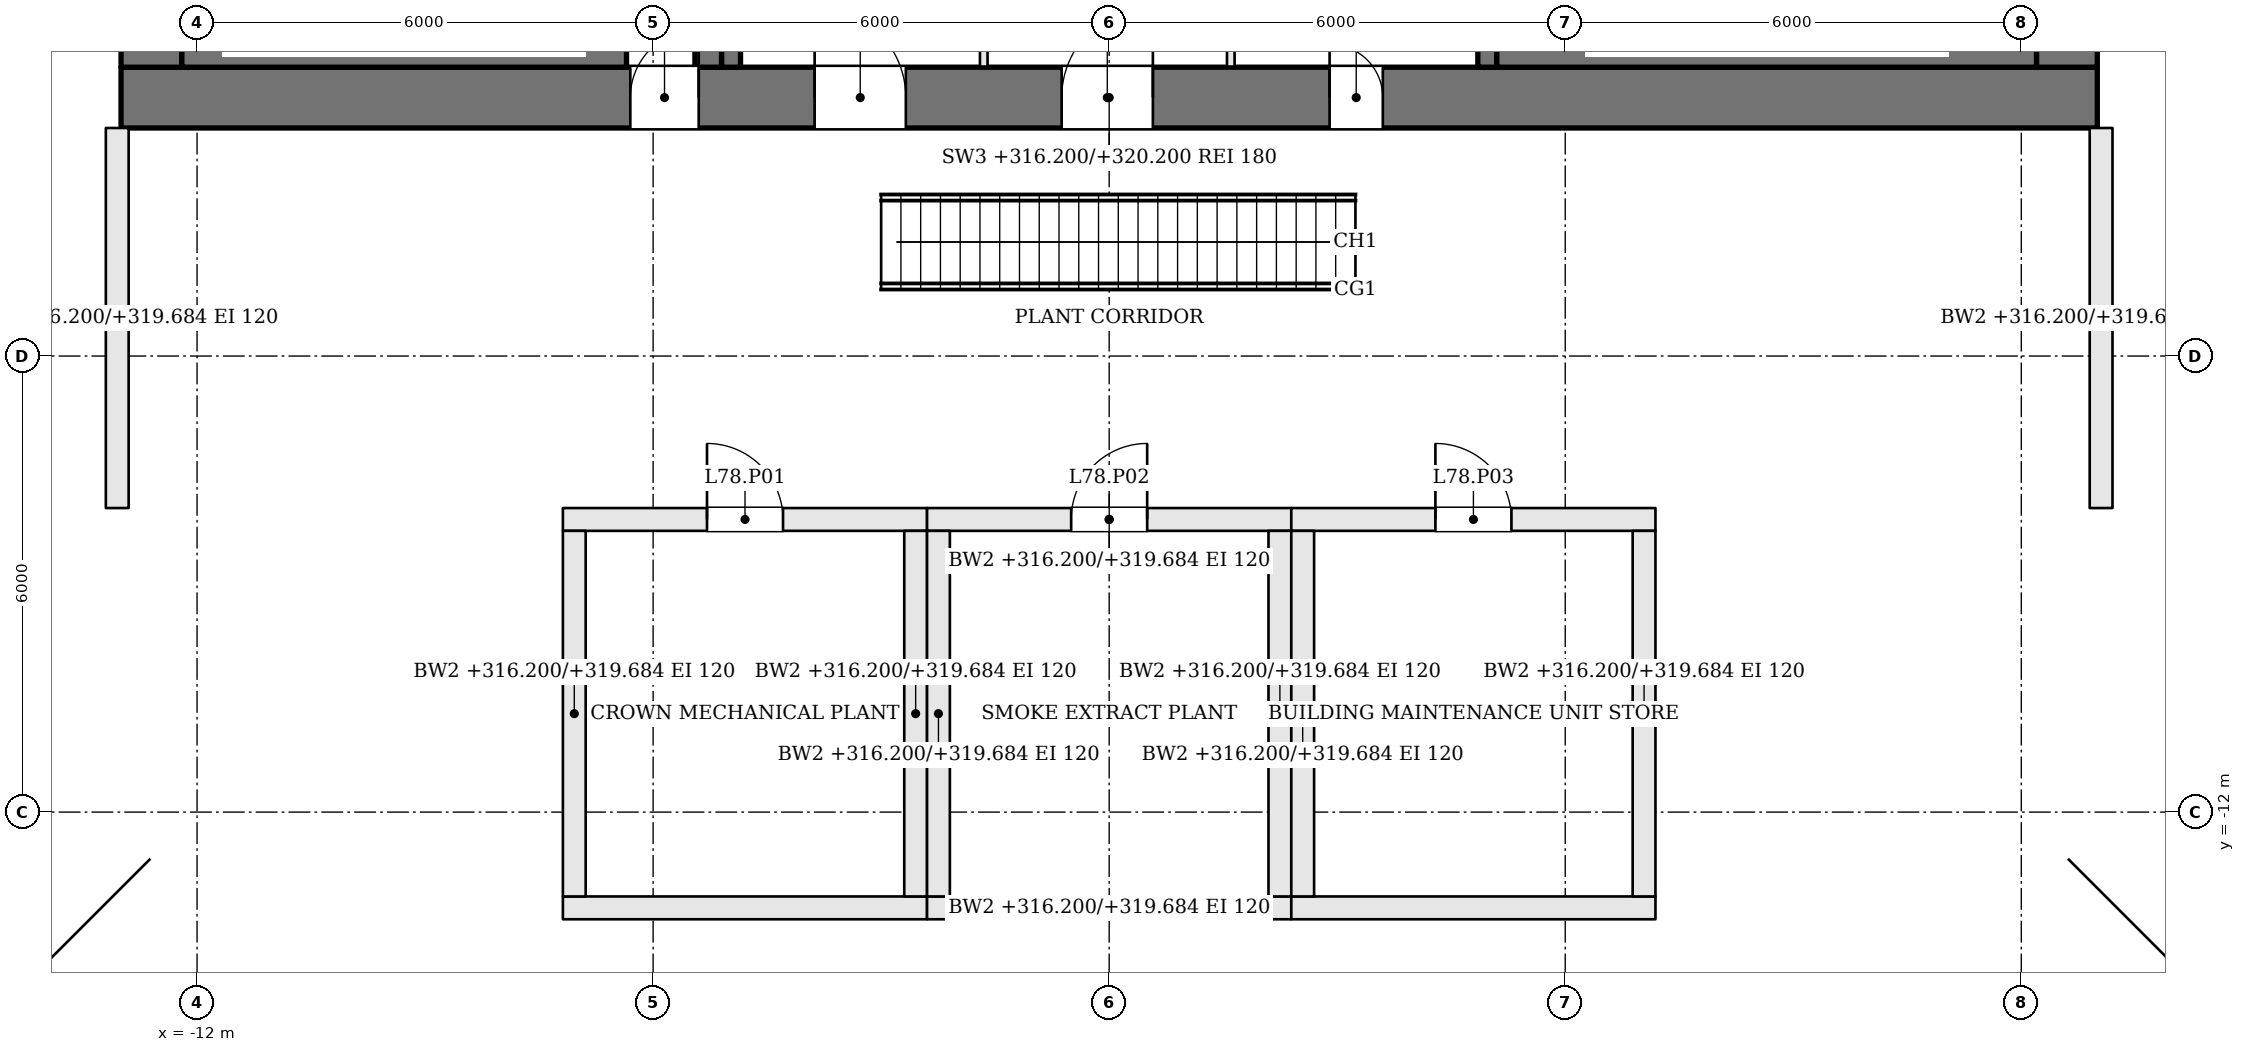
"""IFC4 building model, lengths in metres.
Left out: names, types, materials, properties, quantities, classifications, styles, units other than length and angle.
Written with IfcOpenShell. Run it as: python <this file> out.ifc"""

import sys

from ifc_helpers import new_model, si_unit, direction, frame, frame_2d, origin, place, context, subcontext, project, spatial, rectangle, extrude, element, fill, save


model = new_model("IFC4")
c1 = context("Model", 3, precision=1e-05, world=origin(), true_north=direction((0.0, 1.0)))
c2 = subcontext(c1, "Body", "Model", "MODEL_VIEW")
j1 = project(units=[si_unit("LENGTHUNIT", "METRE"), si_unit("PLANEANGLEUNIT", "RADIAN")], contexts=[c1])
p1 = place(None, origin())
s1 = spatial("IfcSite", under=j1, at=p1, CompositionType="ELEMENT")
p2 = place(p1, origin())
s2 = spatial("IfcBuilding", under=s1, at=p2, CompositionType="ELEMENT")
p3 = place(p2, frame((0.0, 0.0, 316.2)))
s3 = spatial("IfcBuildingStorey", under=s2, at=p3, CompositionType="ELEMENT", Elevation=316.2)
p4 = place(p3, frame((-13.0, -2.6, 0.0), z_axis=(0.0, 0.0, 1.0), x_axis=(1.0, 0.0, 0.0)))
e1 = element("IfcWall", 1, at=p4, inside=s3, PredefinedType="SHEAR", context=c2, shape_type="SweptSolid", body=[
    extrude(rectangle(XDim=26.0, YDim=0.8, at=frame_2d((13.0, 0.0))), origin(), (0.0, 0.0, 1.0), 4.0),
])
p5 = place(p4, frame((9.125, 0.0, 0.0)))
e2 = element("IfcOpeningElement", 2, at=p5, cuts=e1, PredefinedType="OPENING", context=c2, shape_type="SweptSolid", body=[
    extrude(rectangle(XDim=1.2, YDim=2.1, at=frame_2d((0.6, 1.05))), frame((0.0, 0.41, 0.0), z_axis=(0.0, -1.0, 0.0), x_axis=(1.0, 0.0, 0.0)), (0.0, 0.0, 1.0), 0.82),
])
p6 = place(p4, frame((12.375, 0.0, 0.0)))
e3 = element("IfcOpeningElement", 3, at=p6, cuts=e1, PredefinedType="OPENING", context=c2, shape_type="SweptSolid", body=[
    extrude(rectangle(XDim=1.2, YDim=2.1, at=frame_2d((0.6, 1.05))), frame((0.0, 0.41, 0.0), z_axis=(0.0, -1.0, 0.0), x_axis=(1.0, 0.0, 0.0)), (0.0, 0.0, 1.0), 0.82),
])
p7 = place(p4, frame((15.9, 0.0, 0.0)))
e4 = element("IfcOpeningElement", 4, at=p7, cuts=e1, PredefinedType="OPENING", context=c2, shape_type="SweptSolid", body=[
    extrude(rectangle(XDim=0.7, YDim=2.1, at=frame_2d((0.35, 1.05))), frame((0.0, 0.41, 0.0), z_axis=(0.0, -1.0, 0.0), x_axis=(1.0, 0.0, 0.0)), (0.0, 0.0, 1.0), 0.82),
])
p8 = place(p4, frame((6.7, 0.0, 0.0)))
e5 = element("IfcOpeningElement", 5, at=p8, cuts=e1, PredefinedType="OPENING", context=c2, shape_type="SweptSolid", body=[
    extrude(rectangle(XDim=0.9, YDim=2.1, at=frame_2d((0.45, 1.05))), frame((0.0, 0.41, 0.0), z_axis=(0.0, -1.0, 0.0), x_axis=(1.0, 0.0, 0.0)), (0.0, 0.0, 1.0), 0.82),
])
p9 = place(p3, frame((12.6, -2.2, 0.0), z_axis=(0.0, 0.0, 1.0), x_axis=(0.0, 1.0, 0.0)))
e6 = element("IfcWall", 6, at=p9, inside=s3, PredefinedType="SHEAR", context=c2, shape_type="SweptSolid", body=[
    extrude(rectangle(XDim=13.4, YDim=0.8, at=frame_2d((6.7, 0.0))), origin(), (0.0, 0.0, 1.0), 4.0),
])
p10 = place(p9, frame((7.4, 0.0, 0.0)))
e7 = element("IfcOpeningElement", 7, at=p10, cuts=e6, PredefinedType="OPENING", context=c2, shape_type="SweptSolid", body=[
    extrude(rectangle(XDim=1.8, YDim=2.1, at=frame_2d((0.9, 1.05))), frame((0.0, 0.41, 0.0), z_axis=(0.0, -1.0, 0.0), x_axis=(1.0, 0.0, 0.0)), (0.0, 0.0, 1.0), 0.82),
])
p11 = place(p3, frame((-12.6, -2.2, 0.0), z_axis=(0.0, 0.0, 1.0), x_axis=(0.0, 1.0, 0.0)))
e8 = element("IfcWall", 8, at=p11, inside=s3, PredefinedType="SHEAR", context=c2, shape_type="SweptSolid", body=[
    extrude(rectangle(XDim=13.4, YDim=0.8, at=frame_2d((6.7, 0.0))), origin(), (0.0, 0.0, 1.0), 4.0),
])
p12 = place(p11, frame((4.2, 0.0, 0.0)))
e9 = element("IfcOpeningElement", 9, at=p12, cuts=e8, PredefinedType="OPENING", context=c2, shape_type="SweptSolid", body=[
    extrude(rectangle(XDim=1.8, YDim=2.1, at=frame_2d((0.9, 1.05))), frame((0.0, 0.41, 0.0), z_axis=(0.0, -1.0, 0.0), x_axis=(1.0, 0.0, 0.0)), (0.0, 0.0, 1.0), 0.82),
])
p13 = place(p3, frame((-4.975, -2.2, 0.0), z_axis=(0.0, 0.0, 1.0), x_axis=(0.0, 1.0, 0.0)))
e10 = element("IfcWall", 10, at=p13, inside=s3, PredefinedType="SOLIDWALL", context=c2, shape_type="SweptSolid", body=[
    extrude(rectangle(XDim=13.4, YDim=0.25, at=frame_2d((6.7, 0.0))), origin(), (0.0, 0.0, 1.0), 3.28),
])
p14 = place(p13, frame((5.25, 0.0, 0.0)))
e11 = element("IfcOpeningElement", 11, at=p14, cuts=e10, PredefinedType="OPENING", context=c2, shape_type="SweptSolid", body=[
    extrude(rectangle(XDim=1.2, YDim=2.1, at=frame_2d((0.6, 1.05))), frame((0.0, 0.135, 0.0), z_axis=(0.0, -1.0, 0.0), x_axis=(1.0, 0.0, 0.0)), (0.0, 0.0, 1.0), 0.27),
])
p15 = place(p3, frame((4.975, 11.2, 0.0), z_axis=(0.0, 0.0, 1.0), x_axis=(0.0, -1.0, 0.0)))
e12 = element("IfcWall", 12, at=p15, inside=s3, PredefinedType="SOLIDWALL", context=c2, shape_type="SweptSolid", body=[
    extrude(rectangle(XDim=13.4, YDim=0.25, at=frame_2d((6.7, 0.0))), origin(), (0.0, 0.0, 1.0), 3.28),
])
p16 = place(p15, frame((5.25, 0.0, 0.0)))
e13 = element("IfcOpeningElement", 13, at=p16, cuts=e12, PredefinedType="OPENING", context=c2, shape_type="SweptSolid", body=[
    extrude(rectangle(XDim=1.2, YDim=2.1, at=frame_2d((0.6, 1.05))), frame((0.0, 0.135, 0.0), z_axis=(0.0, -1.0, 0.0), x_axis=(1.0, 0.0, 0.0)), (0.0, 0.0, 1.0), 0.27),
])
p17 = place(p3, frame((-12.2, -1.9, 0.0), z_axis=(0.0, 0.0, 1.0), x_axis=(1.0, 0.0, 0.0)))
e14 = element("IfcWall", 14, at=p17, inside=s3, PredefinedType="SOLIDWALL", context=c2, shape_type="SweptSolid", body=[
    extrude(rectangle(XDim=5.85, YDim=0.6, at=frame_2d((2.925, 0.0))), origin(), (0.0, 0.0, 1.0), 3.28),
])
p18 = place(p3, frame((-5.275, -2.2, 0.0), z_axis=(0.0, 0.0, 1.0), x_axis=(0.0, 1.0, 0.0)))
e15 = element("IfcWall", 15, at=p18, inside=s3, PredefinedType="SOLIDWALL", context=c2, shape_type="SweptSolid", body=[
    extrude(rectangle(XDim=0.6, YDim=0.35, at=frame_2d((0.3, 0.0))), origin(), (0.0, 0.0, 1.0), 3.28),
])
p19 = place(p3, frame((12.2, -1.9, 0.0), z_axis=(0.0, 0.0, 1.0), x_axis=(-1.0, 0.0, 0.0)))
e16 = element("IfcWall", 16, at=p19, inside=s3, PredefinedType="SOLIDWALL", context=c2, shape_type="SweptSolid", body=[
    extrude(rectangle(XDim=7.1, YDim=0.6, at=frame_2d((3.55, 0.0))), origin(), (0.0, 0.0, 1.0), 3.28),
])
for number, where, z_axis, x_axis in (
    (17, (-1.65, -2.2, 0.0), (0.0, 0.0, 1.0), (0.0, 1.0, 0.0)),
    (18, (1.6, -2.2, 0.0), (0.0, 0.0, 1.0), (0.0, 1.0, 0.0)),
):
    element("IfcWall", number, at=place(p3, frame(where, z_axis=z_axis, x_axis=x_axis)), inside=s3, PredefinedType="PARTITIONING", context=c2, shape_type="SweptSolid", body=[
        extrude(rectangle(XDim=2.6, YDim=0.1, at=frame_2d((1.3, 0.0))), origin(), (0.0, 0.0, 1.0), 3.28),
    ])
p20 = place(p3, frame((-7.187, -8.15, 0.0), z_axis=(0.0, 0.0, 1.0), x_axis=(1.0, 0.0, 0.0)))
e19 = element("IfcWall", 19, at=p20, inside=s3, PredefinedType="SOLIDWALL", context=c2, shape_type="SweptSolid", body=[
    extrude(rectangle(XDim=4.791, YDim=0.3, at=frame_2d((2.396, 0.0))), origin(), (0.0, 0.0, 1.0), 3.484),
])
p21 = place(p20, frame((1.896, 0.0, 0.0)))
e20 = element("IfcOpeningElement", 20, at=p21, cuts=e19, PredefinedType="OPENING", context=c2, shape_type="SweptSolid", body=[
    extrude(rectangle(XDim=1.0, YDim=2.1, at=frame_2d((0.5, 1.05))), frame((0.0, 0.16, 0.0), z_axis=(0.0, -1.0, 0.0), x_axis=(1.0, 0.0, 0.0)), (0.0, 0.0, 1.0), 0.32),
])
p22 = place(p3, frame((-7.187, -13.26, 0.0), z_axis=(0.0, 0.0, 1.0), x_axis=(1.0, 0.0, 0.0)))
e21 = element("IfcWall", 21, at=p22, inside=s3, PredefinedType="SOLIDWALL", context=c2, shape_type="SweptSolid", body=[
    extrude(rectangle(XDim=4.791, YDim=0.3, at=frame_2d((2.396, 0.0))), origin(), (0.0, 0.0, 1.0), 3.484),
])
for number, where, z_axis, x_axis in (
    (22, (-7.037, -13.11, 0.0), (0.0, 0.0, 1.0), (0.0, 1.0, 0.0)),
    (23, (-2.546, -13.11, 0.0), (0.0, 0.0, 1.0), (0.0, 1.0, 0.0)),
):
    element("IfcWall", number, at=place(p3, frame(where, z_axis=z_axis, x_axis=x_axis)), inside=s3, PredefinedType="SOLIDWALL", context=c2, shape_type="SweptSolid", body=[
        extrude(rectangle(XDim=4.81, YDim=0.3, at=frame_2d((2.405, 0.0))), origin(), (0.0, 0.0, 1.0), 3.484),
    ])
p23 = place(p3, frame((-2.396, -8.15, 0.0), z_axis=(0.0, 0.0, 1.0), x_axis=(1.0, 0.0, 0.0)))
e24 = element("IfcWall", 24, at=p23, inside=s3, PredefinedType="SOLIDWALL", context=c2, shape_type="SweptSolid", body=[
    extrude(rectangle(XDim=4.792, YDim=0.3, at=frame_2d((2.396, 0.0))), origin(), (0.0, 0.0, 1.0), 3.484),
])
p24 = place(p23, frame((1.896, 0.0, 0.0)))
e25 = element("IfcOpeningElement", 25, at=p24, cuts=e24, PredefinedType="OPENING", context=c2, shape_type="SweptSolid", body=[
    extrude(rectangle(XDim=1.0, YDim=2.1, at=frame_2d((0.5, 1.05))), frame((0.0, 0.16, 0.0), z_axis=(0.0, -1.0, 0.0), x_axis=(1.0, 0.0, 0.0)), (0.0, 0.0, 1.0), 0.32),
])
p25 = place(p3, frame((-2.396, -13.26, 0.0), z_axis=(0.0, 0.0, 1.0), x_axis=(1.0, 0.0, 0.0)))
e26 = element("IfcWall", 26, at=p25, inside=s3, PredefinedType="SOLIDWALL", context=c2, shape_type="SweptSolid", body=[
    extrude(rectangle(XDim=4.792, YDim=0.3, at=frame_2d((2.396, 0.0))), origin(), (0.0, 0.0, 1.0), 3.484),
])
for number, where, z_axis, x_axis in (
    (27, (-2.246, -13.11, 0.0), (0.0, 0.0, 1.0), (0.0, 1.0, 0.0)),
    (28, (2.246, -13.11, 0.0), (0.0, 0.0, 1.0), (0.0, 1.0, 0.0)),
):
    element("IfcWall", number, at=place(p3, frame(where, z_axis=z_axis, x_axis=x_axis)), inside=s3, PredefinedType="SOLIDWALL", context=c2, shape_type="SweptSolid", body=[
        extrude(rectangle(XDim=4.81, YDim=0.3, at=frame_2d((2.405, 0.0))), origin(), (0.0, 0.0, 1.0), 3.484),
    ])
p26 = place(p3, frame((2.396, -8.15, 0.0), z_axis=(0.0, 0.0, 1.0), x_axis=(1.0, 0.0, 0.0)))
e29 = element("IfcWall", 29, at=p26, inside=s3, PredefinedType="SOLIDWALL", context=c2, shape_type="SweptSolid", body=[
    extrude(rectangle(XDim=4.791, YDim=0.3, at=frame_2d((2.396, 0.0))), origin(), (0.0, 0.0, 1.0), 3.484),
])
p27 = place(p26, frame((1.896, 0.0, 0.0)))
e30 = element("IfcOpeningElement", 30, at=p27, cuts=e29, PredefinedType="OPENING", context=c2, shape_type="SweptSolid", body=[
    extrude(rectangle(XDim=1.0, YDim=2.1, at=frame_2d((0.5, 1.05))), frame((0.0, 0.16, 0.0), z_axis=(0.0, -1.0, 0.0), x_axis=(1.0, 0.0, 0.0)), (0.0, 0.0, 1.0), 0.32),
])
p28 = place(p3, frame((2.396, -13.26, 0.0), z_axis=(0.0, 0.0, 1.0), x_axis=(1.0, 0.0, 0.0)))
e31 = element("IfcWall", 31, at=p28, inside=s3, PredefinedType="SOLIDWALL", context=c2, shape_type="SweptSolid", body=[
    extrude(rectangle(XDim=4.791, YDim=0.3, at=frame_2d((2.396, 0.0))), origin(), (0.0, 0.0, 1.0), 3.484),
])
for number, where, z_axis, x_axis in (
    (32, (2.546, -13.11, 0.0), (0.0, 0.0, 1.0), (0.0, 1.0, 0.0)),
    (33, (7.037, -13.11, 0.0), (0.0, 0.0, 1.0), (0.0, 1.0, 0.0)),
):
    element("IfcWall", number, at=place(p3, frame(where, z_axis=z_axis, x_axis=x_axis)), inside=s3, PredefinedType="SOLIDWALL", context=c2, shape_type="SweptSolid", body=[
        extrude(rectangle(XDim=4.81, YDim=0.3, at=frame_2d((2.405, 0.0))), origin(), (0.0, 0.0, 1.0), 3.484),
    ])
for number, where, z_axis, x_axis in (
    (34, (-13.05, -8.0, 0.0), (0.0, 0.0, 1.0), (0.0, 1.0, 0.0)),
    (35, (13.05, -8.0, 0.0), (0.0, 0.0, 1.0), (0.0, 1.0, 0.0)),
):
    element("IfcWall", number, at=place(p3, frame(where, z_axis=z_axis, x_axis=x_axis)), inside=s3, PredefinedType="SOLIDWALL", context=c2, shape_type="SweptSolid", body=[
        extrude(rectangle(XDim=5.0, YDim=0.3, at=frame_2d((2.5, 0.0))), origin(), (0.0, 0.0, 1.0), 3.484),
    ])
p29 = place(p5, origin())
e36 = element("IfcDoor", 36, at=p29, inside=s3, OperationType="SINGLE_SWING_LEFT", PredefinedType="DOOR", context=c2, shape_type="SweptSolid", body=[
    extrude(rectangle(XDim=1.2, YDim=2.1, at=frame_2d((0.6, 1.05))), frame((0.0, 0.025, 0.0), z_axis=(0.0, -1.0, 0.0), x_axis=(1.0, 0.0, 0.0)), (0.0, 0.0, 1.0), 0.05),
])
fill(e2, e36)
p30 = place(p6, origin())
e37 = element("IfcDoor", 37, at=p30, inside=s3, OperationType="SINGLE_SWING_RIGHT", PredefinedType="DOOR", context=c2, shape_type="SweptSolid", body=[
    extrude(rectangle(XDim=1.2, YDim=2.1, at=frame_2d((0.6, 1.05))), frame((0.0, 0.025, 0.0), z_axis=(0.0, -1.0, 0.0), x_axis=(1.0, 0.0, 0.0)), (0.0, 0.0, 1.0), 0.05),
])
fill(e3, e37)
p31 = place(p7, origin())
e38 = element("IfcDoor", 38, at=p31, inside=s3, OperationType="SINGLE_SWING_LEFT", PredefinedType="DOOR", context=c2, shape_type="SweptSolid", body=[
    extrude(rectangle(XDim=0.7, YDim=2.1, at=frame_2d((0.35, 1.05))), frame((0.0, 0.025, 0.0), z_axis=(0.0, -1.0, 0.0), x_axis=(1.0, 0.0, 0.0)), (0.0, 0.0, 1.0), 0.05),
])
fill(e4, e38)
p32 = place(p21, origin())
e39 = element("IfcDoor", 39, at=p32, inside=s3, OperationType="SINGLE_SWING_LEFT", PredefinedType="DOOR", context=c2, shape_type="SweptSolid", body=[
    extrude(rectangle(XDim=1.0, YDim=2.1, at=frame_2d((0.5, 1.05))), frame((0.0, 0.025, 0.0), z_axis=(0.0, -1.0, 0.0), x_axis=(1.0, 0.0, 0.0)), (0.0, 0.0, 1.0), 0.05),
])
fill(e20, e39)
p33 = place(p24, origin())
e40 = element("IfcDoor", 40, at=p33, inside=s3, OperationType="SINGLE_SWING_RIGHT", PredefinedType="DOOR", context=c2, shape_type="SweptSolid", body=[
    extrude(rectangle(XDim=1.0, YDim=2.1, at=frame_2d((0.5, 1.05))), frame((0.0, 0.025, 0.0), z_axis=(0.0, -1.0, 0.0), x_axis=(1.0, 0.0, 0.0)), (0.0, 0.0, 1.0), 0.05),
])
fill(e25, e40)
p34 = place(p27, origin())
e41 = element("IfcDoor", 41, at=p34, inside=s3, OperationType="SINGLE_SWING_LEFT", PredefinedType="DOOR", context=c2, shape_type="SweptSolid", body=[
    extrude(rectangle(XDim=1.0, YDim=2.1, at=frame_2d((0.5, 1.05))), frame((0.0, 0.025, 0.0), z_axis=(0.0, -1.0, 0.0), x_axis=(1.0, 0.0, 0.0)), (0.0, 0.0, 1.0), 0.05),
])
fill(e30, e41)
p35 = place(p8, origin())
e42 = element("IfcDoor", 42, at=p35, inside=s3, OperationType="SINGLE_SWING_RIGHT", PredefinedType="DOOR", context=c2, shape_type="SweptSolid", body=[
    extrude(rectangle(XDim=0.9, YDim=2.1, at=frame_2d((0.45, 1.05))), frame((0.0, 0.025, 0.0), z_axis=(0.0, -1.0, 0.0), x_axis=(1.0, 0.0, 0.0)), (0.0, 0.0, 1.0), 0.05),
])
fill(e5, e42)
save(model, sys.argv[1])
